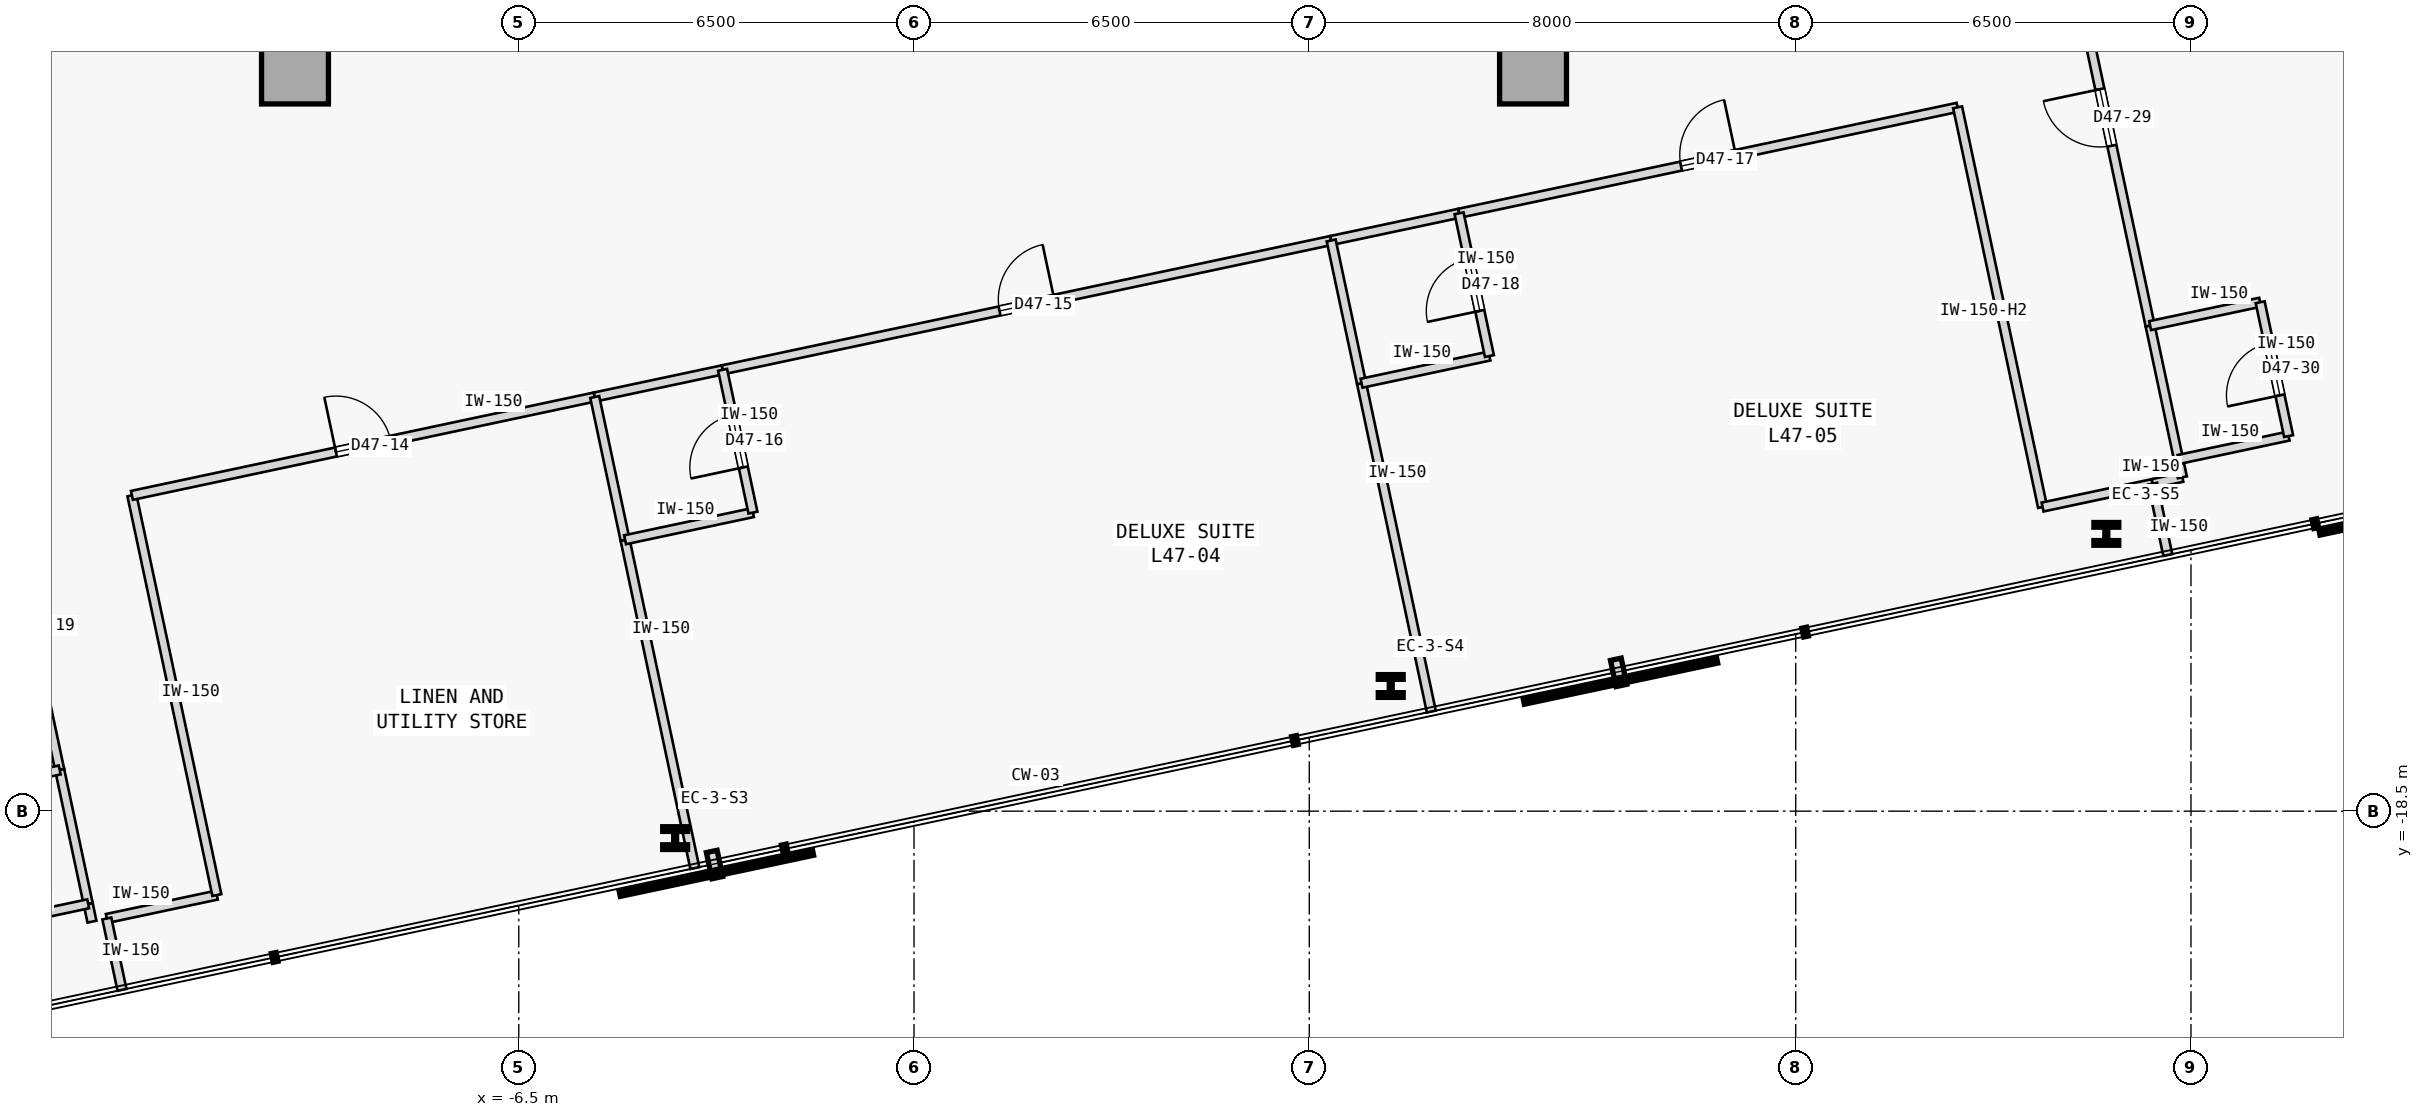
"""IFC4 building model, lengths in metres.
Left out: names, types, materials, properties, quantities, classifications, styles, units other than length and angle.
Written with IfcOpenShell. Run it as: python <this file> out.ifc"""

import sys

from ifc_helpers import new_model, si_unit, direction, frame, frame_2d, origin, origin_2d, place, context, subcontext, project, spatial, rectangle, i_section, extrude, element, fill, save


model = new_model("IFC4")
c1 = context("Model", 3, precision=1e-05, world=origin(), true_north=direction((0.0, 1.0)))
c2 = subcontext(c1, "Body", "Model", "MODEL_VIEW")
j1 = project(units=[si_unit("LENGTHUNIT", "METRE"), si_unit("PLANEANGLEUNIT", "RADIAN")], contexts=[c1])
p1 = place(None, origin())
s1 = spatial("IfcSite", under=j1, at=p1, CompositionType="ELEMENT")
p2 = place(p1, origin())
s2 = spatial("IfcBuilding", under=s1, at=p2, CompositionType="ELEMENT")
p3 = place(p2, frame((0.0, 0.0, 182.0)))
s3 = spatial("IfcBuildingStorey", under=s2, at=p3, CompositionType="ELEMENT", Elevation=182.0)
for number, where, z_axis, x_axis in (
    (1, (-10.18, -6.32, 0.0), (0.0, 0.0, 1.0), (1.0, 0.0, 0.0)),
    (2, (10.18, -6.32, 0.0), (0.0, 0.0, 1.0), (1.0, 0.0, 0.0)),
):
    element("IfcColumn", number, at=place(p3, frame(where, z_axis=z_axis, x_axis=x_axis)), inside=s3, PredefinedType="COLUMN", context=c2, shape_type="SweptSolid", body=[
        extrude(rectangle(XDim=1.1, YDim=1.1, at=origin_2d()), origin(), (0.0, 0.0, 1.0), 3.4),
    ])
for number, where, z_axis, x_axis in (
    (3, (-3.928, -18.943, 0.0), (0.0, 0.0, 1.0), (1.0, 0.0, 0.0)),
    (4, (7.84, -16.441, 0.0), (0.0, 0.0, 1.0), (1.0, 0.0, 0.0)),
    (5, (19.608, -13.94, 0.0), (0.0, 0.0, 1.0), (1.0, 0.0, 0.0)),
):
    element("IfcColumn", number, at=place(p3, frame(where, z_axis=z_axis, x_axis=x_axis)), inside=s3, PredefinedType="COLUMN", context=c2, shape_type="SweptSolid", body=[
        extrude(i_section(OverallWidth=0.409, OverallDepth=0.374, WebThickness=0.048, FlangeThickness=0.077, FilletRadius=0.015, at=origin_2d()), origin(), (0.0, 0.0, 1.0), 3.4),
    ])
p4 = place(p3, frame((-13.274, -20.265, 0.0), z_axis=(0.0, 0.0, 1.0), x_axis=(0.978160192495, 0.207852442415, 0.0)))
e6 = element("IfcWall", 6, at=p4, inside=s3, PredefinedType="PARTITIONING", context=c2, shape_type="SweptSolid", body=[
    extrude(rectangle(XDim=1.85, YDim=0.15, at=frame_2d((0.925, 0.0))), origin(), (0.0, 0.0, 1.0), 3.175),
])
p5 = place(p3, frame((-11.465, -19.88, 0.0), z_axis=(0.0, 0.0, 1.0), x_axis=(-0.207916109912, 0.978146661416, 0.0)))
e7 = element("IfcWall", 7, at=p5, inside=s3, PredefinedType="PARTITIONING", context=c2, shape_type="SweptSolid", body=[
    extrude(rectangle(XDim=6.72, YDim=0.15, at=frame_2d((3.36, 0.0))), origin(), (0.0, 0.0, 1.0), 3.175),
])
p6 = place(p3, frame((-12.862, -13.307, 0.0), z_axis=(0.0, 0.0, 1.0), x_axis=(0.978144096287, 0.20792817726, 0.0)))
e8 = element("IfcWall", 8, at=p6, inside=s3, PredefinedType="PARTITIONING", context=c2, shape_type="SweptSolid", body=[
    extrude(rectangle(XDim=7.781, YDim=0.15, at=frame_2d((3.891, 0.0))), origin(), (0.0, 0.0, 1.0), 3.175),
])
p7 = place(p6, frame((3.43, 0.0, 0.0)))
e9 = element("IfcOpeningElement", 9, at=p7, cuts=e8, PredefinedType="OPENING", context=c2, shape_type="SweptSolid", body=[
    extrude(rectangle(XDim=0.92, YDim=2.15, at=frame_2d((0.46, 1.075))), frame((0.0, 0.085, 0.0), z_axis=(0.0, -1.0, 0.0), x_axis=(1.0, 0.0, 0.0)), (0.0, 0.0, 1.0), 0.17),
])
p8 = place(p3, frame((-3.148, -11.242, 0.0), z_axis=(0.0, 0.0, 1.0), x_axis=(0.978150238925, 0.207899278718, 0.0)))
e10 = element("IfcWall", 10, at=p8, inside=s3, PredefinedType="PARTITIONING", context=c2, shape_type="SweptSolid", body=[
    extrude(rectangle(XDim=10.232, YDim=0.15, at=frame_2d((5.116, 0.0))), origin(), (0.0, 0.0, 1.0), 3.175),
])
p9 = place(p8, frame((4.656, 0.0, 0.0)))
e11 = element("IfcOpeningElement", 11, at=p9, cuts=e10, PredefinedType="OPENING", context=c2, shape_type="SweptSolid", body=[
    extrude(rectangle(XDim=0.92, YDim=2.15, at=frame_2d((0.46, 1.075))), frame((0.0, 0.085, 0.0), z_axis=(0.0, -1.0, 0.0), x_axis=(1.0, 0.0, 0.0)), (0.0, 0.0, 1.0), 0.17),
])
p10 = place(p3, frame((-5.251, -11.689, 0.0), z_axis=(0.0, 0.0, 1.0), x_axis=(0.978146728319, 0.207915795165, 0.0)))
e12 = element("IfcWall", 12, at=p10, inside=s3, PredefinedType="PARTITIONING", context=c2, shape_type="SweptSolid", body=[
    extrude(rectangle(XDim=2.15, YDim=0.15, at=frame_2d((1.075, 0.0))), origin(), (0.0, 0.0, 1.0), 3.175),
])
p11 = place(p3, frame((8.964, -8.668, 0.0), z_axis=(0.0, 0.0, 1.0), x_axis=(0.978149300771, 0.20790369261, 0.0)))
e13 = element("IfcWall", 13, at=p11, inside=s3, PredefinedType="PARTITIONING", context=c2, shape_type="SweptSolid", body=[
    extrude(rectangle(XDim=8.382, YDim=0.15, at=frame_2d((4.191, 0.0))), origin(), (0.0, 0.0, 1.0), 3.175),
])
p12 = place(p11, frame((3.731, 0.0, 0.0)))
e14 = element("IfcOpeningElement", 14, at=p12, cuts=e13, PredefinedType="OPENING", context=c2, shape_type="SweptSolid", body=[
    extrude(rectangle(XDim=0.92, YDim=2.15, at=frame_2d((0.46, 1.075))), frame((0.0, 0.085, 0.0), z_axis=(0.0, -1.0, 0.0), x_axis=(1.0, 0.0, 0.0)), (0.0, 0.0, 1.0), 0.17),
])
p13 = place(p3, frame((18.56, -13.498, 0.0), z_axis=(0.0, 0.0, 1.0), x_axis=(-0.207888737749, 0.978152479278, 0.0)))
e15 = element("IfcWall", 15, at=p13, inside=s3, PredefinedType="PARTITIONING", context=c2, shape_type="SweptSolid", body=[
    extrude(rectangle(XDim=6.72, YDim=0.15, at=frame_2d((3.36, 0.0))), origin(), (0.0, 0.0, 1.0), 2.575),
])
p14 = place(p3, frame((18.56, -13.498, 0.0), z_axis=(0.0, 0.0, 1.0), x_axis=(0.978160192495, 0.207852442415, 0.0)))
e16 = element("IfcWall", 16, at=p14, inside=s3, PredefinedType="PARTITIONING", context=c2, shape_type="SweptSolid", body=[
    extrude(rectangle(XDim=1.85, YDim=0.15, at=frame_2d((0.925, 0.0))), origin(), (0.0, 0.0, 1.0), 3.175),
])
p15 = place(p3, frame((6.861, -9.115, 0.0), z_axis=(0.0, 0.0, 1.0), x_axis=(0.978146728319, 0.207915795165, 0.0)))
e17 = element("IfcWall", 17, at=p15, inside=s3, PredefinedType="PARTITIONING", context=c2, shape_type="SweptSolid", body=[
    extrude(rectangle(XDim=2.15, YDim=0.15, at=frame_2d((1.075, 0.0))), origin(), (0.0, 0.0, 1.0), 3.175),
])
p16 = place(p3, frame((-13.519, -20.317, 0.0), z_axis=(0.0, 0.0, 1.0), x_axis=(-0.207527808066, 0.978229118806, 0.0)))
e18 = element("IfcWall", 18, at=p16, inside=s3, PredefinedType="PARTITIONING", context=c2, shape_type="SweptSolid", body=[
    extrude(rectangle(XDim=0.3, YDim=0.15, at=frame_2d((0.15, 0.0))), origin(), (0.0, 0.0, 1.0), 3.175),
])
p17 = place(p3, frame((-14.049, -17.823, 0.0), z_axis=(0.0, 0.0, 1.0), x_axis=(-0.2079027059, 0.978149510494, 0.0)))
e19 = element("IfcWall", 19, at=p17, inside=s3, PredefinedType="PARTITIONING", context=c2, shape_type="SweptSolid", body=[
    extrude(rectangle(XDim=4.85, YDim=0.15, at=frame_2d((2.425, 0.0))), origin(), (0.0, 0.0, 1.0), 3.175),
])
p18 = place(p17, frame((1.95, 0.0, 0.0)))
e20 = element("IfcOpeningElement", 20, at=p18, cuts=e19, PredefinedType="OPENING", context=c2, shape_type="SweptSolid", body=[
    extrude(rectangle(XDim=0.95, YDim=2.15, at=frame_2d((0.475, 1.075))), frame((0.0, 0.085, 0.0), z_axis=(0.0, -1.0, 0.0), x_axis=(1.0, 0.0, 0.0)), (0.0, 0.0, 1.0), 0.17),
])
p19 = place(p3, frame((-13.581, -20.023, 0.0), z_axis=(0.0, 0.0, 1.0), x_axis=(-0.207891197838, 0.978151956427, 0.0)))
e21 = element("IfcWall", 21, at=p19, inside=s3, PredefinedType="PARTITIONING", context=c2, shape_type="SweptSolid", body=[
    extrude(rectangle(XDim=2.25, YDim=0.15, at=frame_2d((1.125, 0.0))), origin(), (0.0, 0.0, 1.0), 3.175),
])
p20 = place(p3, frame((20.369, -13.114, 0.0), z_axis=(0.0, 0.0, 1.0), x_axis=(0.978143962546, 0.207928806409, 0.0)))
e22 = element("IfcWall", 22, at=p20, inside=s3, PredefinedType="PARTITIONING", context=c2, shape_type="SweptSolid", body=[
    extrude(rectangle(XDim=0.5, YDim=0.15, at=frame_2d((0.25, 0.0))), origin(), (0.0, 0.0, 1.0), 3.175),
])
p21 = place(p3, frame((20.858, -13.01, 0.0), z_axis=(0.0, 0.0, 1.0), x_axis=(-0.208306395052, 0.978063620518, 0.0)))
e23 = element("IfcWall", 23, at=p21, inside=s3, PredefinedType="PARTITIONING", context=c2, shape_type="SweptSolid", body=[
    extrude(rectangle(XDim=0.3, YDim=0.15, at=frame_2d((0.15, 0.0))), origin(), (0.0, 0.0, 1.0), 3.175),
])
p22 = place(p3, frame((20.328, -10.515, 0.0), z_axis=(0.0, 0.0, 1.0), x_axis=(-0.207906726269, 0.978148655968, 0.0)))
e24 = element("IfcWall", 24, at=p22, inside=s3, PredefinedType="PARTITIONING", context=c2, shape_type="SweptSolid", body=[
    extrude(rectangle(XDim=7.0, YDim=0.15, at=frame_2d((3.5, 0.0))), origin(), (0.0, 0.0, 1.0), 3.175),
])
p23 = place(p22, frame((3.025, 0.0, 0.0)))
e25 = element("IfcOpeningElement", 25, at=p23, cuts=e24, PredefinedType="OPENING", context=c2, shape_type="SweptSolid", body=[
    extrude(rectangle(XDim=0.95, YDim=2.15, at=frame_2d((0.475, 1.075))), frame((0.0, 0.085, 0.0), z_axis=(0.0, -1.0, 0.0), x_axis=(1.0, 0.0, 0.0)), (0.0, 0.0, 1.0), 0.17),
])
p24 = place(p3, frame((20.796, -12.716, 0.0), z_axis=(0.0, 0.0, 1.0), x_axis=(-0.207891197838, 0.978151956427, 0.0)))
e26 = element("IfcWall", 26, at=p24, inside=s3, PredefinedType="PARTITIONING", context=c2, shape_type="SweptSolid", body=[
    extrude(rectangle(XDim=2.25, YDim=0.15, at=frame_2d((1.125, 0.0))), origin(), (0.0, 0.0, 1.0), 3.175),
])
p25 = place(p3, frame((-3.604, -19.436, 0.0), z_axis=(0.0, 0.0, 1.0), x_axis=(-0.20791588359, 0.978146709523, 0.0)))
e27 = element("IfcWall", 27, at=p25, inside=s3, PredefinedType="PARTITIONING", context=c2, shape_type="SweptSolid", body=[
    extrude(rectangle(XDim=5.52, YDim=0.15, at=frame_2d((2.76, 0.0))), origin(), (0.0, 0.0, 1.0), 3.175),
])
p26 = place(p3, frame((-4.752, -14.037, 0.0), z_axis=(0.0, 0.0, 1.0), x_axis=(-0.207917150959, 0.978146440129, 0.0)))
e28 = element("IfcWall", 28, at=p26, inside=s3, PredefinedType="PARTITIONING", context=c2, shape_type="SweptSolid", body=[
    extrude(rectangle(XDim=2.4, YDim=0.15, at=frame_2d((1.2, 0.0))), origin(), (0.0, 0.0, 1.0), 3.175),
])
p27 = place(p3, frame((-13.025, -21.439, 0.0), z_axis=(0.0, 0.0, 1.0), x_axis=(-0.207917150959, 0.978146440129, 0.0)))
e29 = element("IfcWall", 29, at=p27, inside=s3, PredefinedType="PARTITIONING", context=c2, shape_type="SweptSolid", body=[
    extrude(rectangle(XDim=1.2, YDim=0.15, at=frame_2d((0.6, 0.0))), origin(), (0.0, 0.0, 1.0), 3.175),
])
p28 = place(p3, frame((-4.752, -14.037, 0.0), z_axis=(0.0, 0.0, 1.0), x_axis=(0.978146728319, 0.207915795165, 0.0)))
e30 = element("IfcWall", 30, at=p28, inside=s3, PredefinedType="PARTITIONING", context=c2, shape_type="SweptSolid", body=[
    extrude(rectangle(XDim=2.15, YDim=0.15, at=frame_2d((1.075, 0.0))), origin(), (0.0, 0.0, 1.0), 3.175),
])
p29 = place(p3, frame((-2.649, -13.59, 0.0), z_axis=(0.0, 0.0, 1.0), x_axis=(-0.207917150959, 0.978146440129, 0.0)))
e31 = element("IfcWall", 31, at=p29, inside=s3, PredefinedType="PARTITIONING", context=c2, shape_type="SweptSolid", body=[
    extrude(rectangle(XDim=2.4, YDim=0.15, at=frame_2d((1.2, 0.0))), origin(), (0.0, 0.0, 1.0), 3.175),
])
p30 = place(p29, frame((0.76, 0.0, 0.0)))
e32 = element("IfcOpeningElement", 32, at=p30, cuts=e31, PredefinedType="OPENING", context=c2, shape_type="SweptSolid", body=[
    extrude(rectangle(XDim=0.88, YDim=2.15, at=frame_2d((0.44, 1.075))), frame((0.0, 0.085, 0.0), z_axis=(0.0, -1.0, 0.0), x_axis=(1.0, 0.0, 0.0)), (0.0, 0.0, 1.0), 0.17),
])
p31 = place(p3, frame((8.507, -16.862, 0.0), z_axis=(0.0, 0.0, 1.0), x_axis=(-0.20791588359, 0.978146709523, 0.0)))
e33 = element("IfcWall", 33, at=p31, inside=s3, PredefinedType="PARTITIONING", context=c2, shape_type="SweptSolid", body=[
    extrude(rectangle(XDim=5.52, YDim=0.15, at=frame_2d((2.76, 0.0))), origin(), (0.0, 0.0, 1.0), 3.175),
])
p32 = place(p3, frame((7.36, -11.462, 0.0), z_axis=(0.0, 0.0, 1.0), x_axis=(-0.207937840262, 0.978142042133, 0.0)))
e34 = element("IfcWall", 34, at=p32, inside=s3, PredefinedType="PARTITIONING", context=c2, shape_type="SweptSolid", body=[
    extrude(rectangle(XDim=2.4, YDim=0.15, at=frame_2d((1.2, 0.0))), origin(), (0.0, 0.0, 1.0), 3.175),
])
p33 = place(p3, frame((7.36, -11.462, 0.0), z_axis=(0.0, 0.0, 1.0), x_axis=(0.978146728319, 0.207915795165, 0.0)))
e35 = element("IfcWall", 35, at=p33, inside=s3, PredefinedType="PARTITIONING", context=c2, shape_type="SweptSolid", body=[
    extrude(rectangle(XDim=2.15, YDim=0.15, at=frame_2d((1.075, 0.0))), origin(), (0.0, 0.0, 1.0), 3.175),
])
p34 = place(p3, frame((9.463, -11.015, 0.0), z_axis=(0.0, 0.0, 1.0), x_axis=(-0.207937840262, 0.978142042133, 0.0)))
e36 = element("IfcWall", 36, at=p34, inside=s3, PredefinedType="PARTITIONING", context=c2, shape_type="SweptSolid", body=[
    extrude(rectangle(XDim=2.4, YDim=0.15, at=frame_2d((1.2, 0.0))), origin(), (0.0, 0.0, 1.0), 3.175),
])
p35 = place(p34, frame((0.76, 0.0, 0.0)))
e37 = element("IfcOpeningElement", 37, at=p35, cuts=e36, PredefinedType="OPENING", context=c2, shape_type="SweptSolid", body=[
    extrude(rectangle(XDim=0.88, YDim=2.15, at=frame_2d((0.44, 1.075))), frame((0.0, 0.085, 0.0), z_axis=(0.0, -1.0, 0.0), x_axis=(1.0, 0.0, 0.0)), (0.0, 0.0, 1.0), 0.17),
])
p36 = place(p3, frame((20.619, -14.288, 0.0), z_axis=(0.0, 0.0, 1.0), x_axis=(-0.207917150959, 0.978146440129, 0.0)))
e38 = element("IfcWall", 38, at=p36, inside=s3, PredefinedType="PARTITIONING", context=c2, shape_type="SweptSolid", body=[
    extrude(rectangle(XDim=1.2, YDim=0.15, at=frame_2d((0.6, 0.0))), origin(), (0.0, 0.0, 1.0), 3.175),
])
for number, where, z_axis, x_axis in (
    (39, (-15.635, -20.46, 0.0), (0.0, 0.0, 1.0), (0.978, 0.208, 0.0)),
    (40, (-16.103, -18.259, 0.0), (0.0, 0.0, 1.0), (0.978, 0.208, 0.0)),
):
    element("IfcWall", number, at=place(p3, frame(where, z_axis=z_axis, x_axis=x_axis)), inside=s3, PredefinedType="PARTITIONING", context=c2, shape_type="SweptSolid", body=[
        extrude(rectangle(XDim=2.1, YDim=0.15, at=frame_2d((1.05, 0.0))), origin(), (0.0, 0.0, 1.0), 3.175),
    ])
for number, where, z_axis, x_axis in (
    (41, (20.796, -12.716, 0.0), (0.0, 0.0, 1.0), (0.978, 0.208, 0.0)),
    (42, (20.328, -10.515, 0.0), (0.0, 0.0, 1.0), (0.978, 0.208, 0.0)),
):
    element("IfcWall", number, at=place(p3, frame(where, z_axis=z_axis, x_axis=x_axis)), inside=s3, PredefinedType="PARTITIONING", context=c2, shape_type="SweptSolid", body=[
        extrude(rectangle(XDim=1.85, YDim=0.15, at=frame_2d((0.925, 0.0))), origin(), (0.0, 0.0, 1.0), 3.175),
    ])
p37 = place(p3, frame((22.605, -12.332, 0.0), z_axis=(0.0, 0.0, 1.0), x_axis=(-0.207891197838, 0.978151956427, 0.0)))
e43 = element("IfcWall", 43, at=p37, inside=s3, PredefinedType="PARTITIONING", context=c2, shape_type="SweptSolid", body=[
    extrude(rectangle(XDim=2.25, YDim=0.15, at=frame_2d((1.125, 0.0))), origin(), (0.0, 0.0, 1.0), 3.175),
])
p38 = place(p37, frame((0.685, 0.0, 0.0)))
e44 = element("IfcOpeningElement", 44, at=p38, cuts=e43, PredefinedType="OPENING", context=c2, shape_type="SweptSolid", body=[
    extrude(rectangle(XDim=0.88, YDim=2.15, at=frame_2d((0.44, 1.075))), frame((0.0, 0.085, 0.0), z_axis=(0.0, -1.0, 0.0), x_axis=(1.0, 0.0, 0.0)), (0.0, 0.0, 1.0), 0.17),
])
p39 = place(p7, origin())
e45 = element("IfcDoor", 45, at=p39, inside=s3, OperationType="SINGLE_SWING_LEFT", PredefinedType="DOOR", context=c2, shape_type="SweptSolid", body=[
    extrude(rectangle(XDim=0.92, YDim=2.15, at=frame_2d((0.46, 1.075))), frame((0.0, 0.025, 0.0), z_axis=(0.0, -1.0, 0.0), x_axis=(1.0, 0.0, 0.0)), (0.0, 0.0, 1.0), 0.05),
])
fill(e9, e45)
p40 = place(p9, origin())
e46 = element("IfcDoor", 46, at=p40, inside=s3, OperationType="SINGLE_SWING_RIGHT", PredefinedType="DOOR", context=c2, shape_type="SweptSolid", body=[
    extrude(rectangle(XDim=0.92, YDim=2.15, at=frame_2d((0.46, 1.075))), frame((0.0, 0.025, 0.0), z_axis=(0.0, -1.0, 0.0), x_axis=(1.0, 0.0, 0.0)), (0.0, 0.0, 1.0), 0.05),
])
fill(e11, e46)
p41 = place(p30, origin())
e47 = element("IfcDoor", 47, at=p41, inside=s3, OperationType="SINGLE_SWING_LEFT", PredefinedType="DOOR", context=c2, shape_type="SweptSolid", body=[
    extrude(rectangle(XDim=0.88, YDim=2.15, at=frame_2d((0.44, 1.075))), frame((0.0, 0.025, 0.0), z_axis=(0.0, -1.0, 0.0), x_axis=(1.0, 0.0, 0.0)), (0.0, 0.0, 1.0), 0.05),
])
fill(e32, e47)
p42 = place(p12, origin())
e48 = element("IfcDoor", 48, at=p42, inside=s3, OperationType="SINGLE_SWING_RIGHT", PredefinedType="DOOR", context=c2, shape_type="SweptSolid", body=[
    extrude(rectangle(XDim=0.92, YDim=2.15, at=frame_2d((0.46, 1.075))), frame((0.0, 0.025, 0.0), z_axis=(0.0, -1.0, 0.0), x_axis=(1.0, 0.0, 0.0)), (0.0, 0.0, 1.0), 0.05),
])
fill(e14, e48)
p43 = place(p35, origin())
e49 = element("IfcDoor", 49, at=p43, inside=s3, OperationType="SINGLE_SWING_LEFT", PredefinedType="DOOR", context=c2, shape_type="SweptSolid", body=[
    extrude(rectangle(XDim=0.88, YDim=2.15, at=frame_2d((0.44, 1.075))), frame((0.0, 0.025, 0.0), z_axis=(0.0, -1.0, 0.0), x_axis=(1.0, 0.0, 0.0)), (0.0, 0.0, 1.0), 0.05),
])
fill(e37, e49)
p44 = place(p23, origin())
e50 = element("IfcDoor", 50, at=p44, inside=s3, OperationType="SINGLE_SWING_RIGHT", PredefinedType="DOOR", context=c2, shape_type="SweptSolid", body=[
    extrude(rectangle(XDim=0.95, YDim=2.15, at=frame_2d((0.475, 1.075))), frame((0.0, 0.025, 0.0), z_axis=(0.0, -1.0, 0.0), x_axis=(1.0, 0.0, 0.0)), (0.0, 0.0, 1.0), 0.05),
])
fill(e25, e50)
p45 = place(p38, origin())
e51 = element("IfcDoor", 51, at=p45, inside=s3, OperationType="SINGLE_SWING_LEFT", PredefinedType="DOOR", context=c2, shape_type="SweptSolid", body=[
    extrude(rectangle(XDim=0.88, YDim=2.15, at=frame_2d((0.44, 1.075))), frame((0.0, 0.025, 0.0), z_axis=(0.0, -1.0, 0.0), x_axis=(1.0, 0.0, 0.0)), (0.0, 0.0, 1.0), 0.05),
])
fill(e44, e51)
save(model, sys.argv[1])
